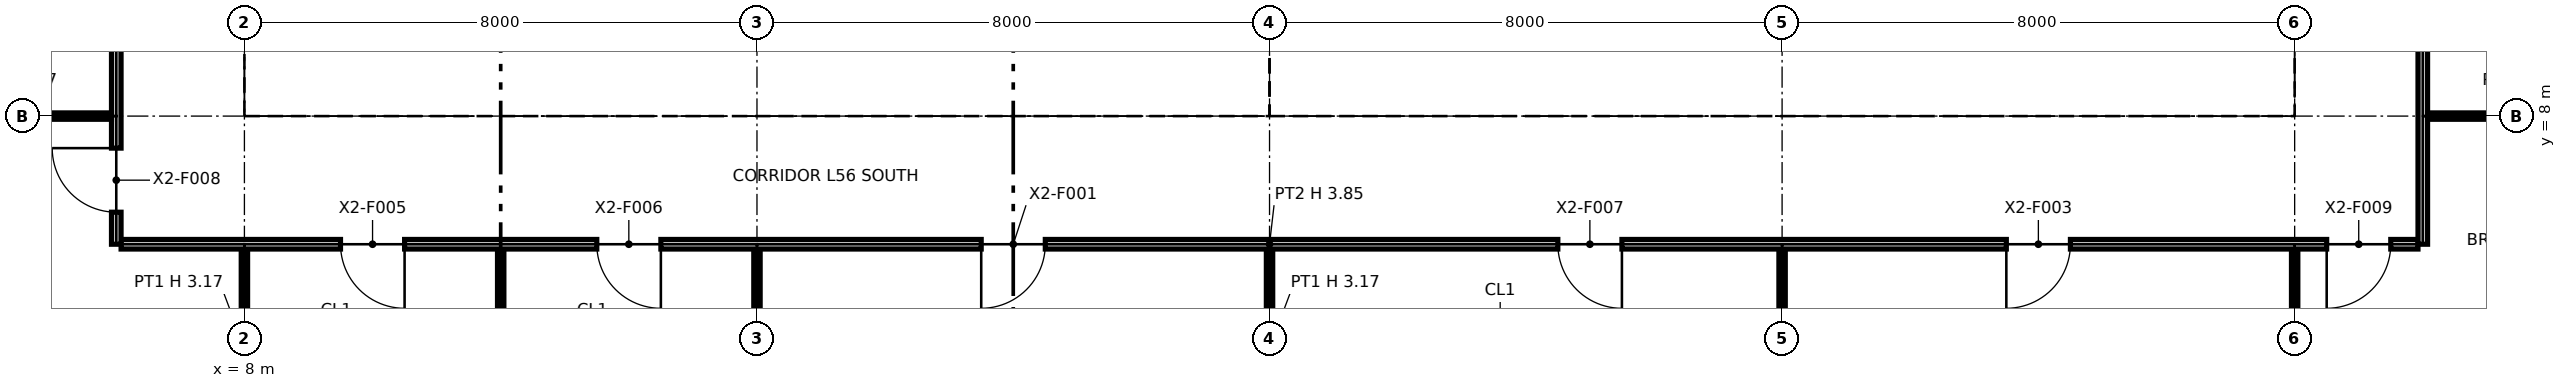
"""IFC4 building model, lengths in metres.
Left out: names, types, materials, properties, quantities, classifications, styles, units other than length and angle.
Written with IfcOpenShell. Run it as: python <this file> out.ifc"""

import sys

from ifc_helpers import new_model, si_unit, direction, frame, frame_2d, origin, origin_2d, place, context, subcontext, project, spatial, polyline, rectangle, i_section, outline, extrude, element, fill, save


model = new_model("IFC4")
c1 = context("Model", 3, precision=1e-05, world=origin(), true_north=direction((0.0, 1.0)))
c2 = subcontext(c1, "Body", "Model", "MODEL_VIEW")
j1 = project(units=[si_unit("LENGTHUNIT", "METRE"), si_unit("PLANEANGLEUNIT", "RADIAN")], contexts=[c1])
p1 = place(None, origin())
s1 = spatial("IfcSite", under=j1, at=p1, CompositionType="ELEMENT")
p2 = place(p1, origin())
s2 = spatial("IfcBuilding", under=s1, at=p2, CompositionType="ELEMENT")
p3 = place(p2, frame((0.0, 0.0, 259.0)))
s3 = spatial("IfcBuildingStorey", under=s2, at=p3, CompositionType="ELEMENT", Elevation=259.0)
for number, where, z_axis, x_axis in (
    (1, (8.0, 8.0, 0.0), (0.0, 0.0, 1.0), (1.0, 0.0, 0.0)),
    (2, (16.0, 8.0, 0.0), (0.0, 0.0, 1.0), (1.0, 0.0, 0.0)),
):
    element("IfcColumn", number, at=place(p3, frame(where, z_axis=z_axis, x_axis=x_axis)), inside=s3, PredefinedType="COLUMN", context=c2, shape_type="SweptSolid", body=[
        extrude(i_section(OverallWidth=0.371, OverallDepth=0.361, WebThickness=0.012, FlangeThickness=0.02, at=origin_2d()), origin(), (0.0, 0.0, 1.0), 3.85),
    ])
p4 = place(p3, frame((24.0, 8.0, 0.0), z_axis=(0.0, 0.0, 1.0), x_axis=(1.0, 0.0, 0.0)))
e3 = element("IfcColumn", 3, at=p4, inside=s3, PredefinedType="COLUMN", context=c2, shape_type="SweptSolid", body=[
    extrude(i_section(OverallWidth=0.373, OverallDepth=0.368, WebThickness=0.015, FlangeThickness=0.024, at=origin_2d()), origin(), (0.0, 0.0, 1.0), 3.85),
])
for number, where, z_axis, x_axis in (
    (4, (32.0, 8.0, 0.0), (0.0, 0.0, 1.0), (1.0, 0.0, 0.0)),
    (5, (40.0, 8.0, 0.0), (0.0, 0.0, 1.0), (1.0, 0.0, 0.0)),
):
    element("IfcColumn", number, at=place(p3, frame(where, z_axis=z_axis, x_axis=x_axis)), inside=s3, PredefinedType="COLUMN", context=c2, shape_type="SweptSolid", body=[
        extrude(i_section(OverallWidth=0.371, OverallDepth=0.361, WebThickness=0.012, FlangeThickness=0.02, at=origin_2d()), origin(), (0.0, 0.0, 1.0), 3.85),
    ])
p5 = place(p3, frame((8.65, 8.75, 0.0), z_axis=(0.0, 0.0, 1.0), x_axis=(1.0, 0.0, 0.0)))
e6 = element("IfcWall", 6, at=p5, inside=s3, PredefinedType="PARTITIONING", context=c2, shape_type="SweptSolid", body=[
    extrude(outline(polyline([(0.0, 0.0), (14.7, 0.0), (14.7, 3.85), (7.438, 3.85), (7.438, 3.308), (7.262, 3.308), (7.261, 3.85), (0.0, 3.85), (0.0, 0.0)])), frame((0.0, 0.1, 0.0), z_axis=(0.0, -1.0, 0.0), x_axis=(1.0, 0.0, 0.0)), (0.0, 0.0, 1.0), 0.2),
])
p6 = place(p5, frame((1.3, 0.0, 0.0)))
e7 = element("IfcOpeningElement", 7, at=p6, cuts=e6, PredefinedType="OPENING", context=c2, shape_type="SweptSolid", body=[
    extrude(rectangle(XDim=1.4, YDim=2.1, at=frame_2d((0.7, 1.05))), frame((0.0, 0.11, 0.0), z_axis=(0.0, -1.0, 0.0), x_axis=(1.0, 0.0, 0.0)), (0.0, 0.0, 1.0), 0.22),
])
p7 = place(p5, frame((4.6, 0.0, 0.0)))
e8 = element("IfcOpeningElement", 8, at=p7, cuts=e6, PredefinedType="OPENING", context=c2, shape_type="SweptSolid", body=[
    extrude(rectangle(XDim=1.4, YDim=2.1, at=frame_2d((0.7, 1.05))), frame((0.0, 0.11, 0.0), z_axis=(0.0, -1.0, 0.0), x_axis=(1.0, 0.0, 0.0)), (0.0, 0.0, 1.0), 0.22),
])
p8 = place(p5, frame((10.4, 0.0, 0.0)))
e9 = element("IfcOpeningElement", 9, at=p8, cuts=e6, PredefinedType="OPENING", context=c2, shape_type="SweptSolid", body=[
    extrude(rectangle(XDim=1.2, YDim=2.1, at=frame_2d((0.6, 1.05))), frame((0.0, 0.11, 0.0), z_axis=(0.0, -1.0, 0.0), x_axis=(1.0, 0.0, 0.0)), (0.0, 0.0, 1.0), 0.22),
])
p9 = place(p3, frame((8.75, 8.85, 0.0), z_axis=(0.0, 0.0, 1.0), x_axis=(0.0, 1.0, 0.0)))
e10 = element("IfcWall", 10, at=p9, inside=s3, PredefinedType="PARTITIONING", context=c2, shape_type="SweptSolid", body=[
    extrude(outline(polyline([(0.0, 0.0), (14.3, 0.0), (14.3, 3.85), (10.225, 3.85), (10.224, 3.44), (10.076, 3.44), (10.075, 3.85), (7.239, 3.85), (7.238, 3.308), (7.062, 3.308), (7.062, 3.85), (0.0, 3.85), (0.0, 0.0)])), frame((0.0, 0.1, 0.0), z_axis=(0.0, -1.0, 0.0), x_axis=(1.0, 0.0, 0.0)), (0.0, 0.0, 1.0), 0.2),
])
p10 = place(p9, frame((8.3, 0.0, 0.0)))
e11 = element("IfcOpeningElement", 11, at=p10, cuts=e10, PredefinedType="OPENING", context=c2, shape_type="SweptSolid", body=[
    extrude(rectangle(XDim=1.8, YDim=2.1, at=frame_2d((0.9, 1.05))), frame((0.0, 0.11, 0.0), z_axis=(0.0, -1.0, 0.0), x_axis=(1.0, 0.0, 0.0)), (0.0, 0.0, 1.0), 0.22),
])
p11 = place(p3, frame((12.4, 8.85, 0.0), z_axis=(0.0, 0.0, 1.0), x_axis=(0.0, 1.0, 0.0)))
e12 = element("IfcWall", 12, at=p11, inside=s3, PredefinedType="PARTITIONING", context=c2, shape_type="SweptSolid", body=[
    extrude(rectangle(XDim=6.85, YDim=0.2, at=frame_2d((3.425, 0.0))), origin(), (0.0, 0.0, 1.0), 3.85),
])
p12 = place(p3, frame((15.85, 8.85, 0.0), z_axis=(0.0, 0.0, 1.0), x_axis=(0.0, 1.0, 0.0)))
e13 = element("IfcWall", 13, at=p12, inside=s3, PredefinedType="PARTITIONING", context=c2, shape_type="SweptSolid", body=[
    extrude(rectangle(XDim=1.55, YDim=0.9, at=frame_2d((0.775, 0.0))), origin(), (0.0, 0.0, 1.0), 3.308),
])
p13 = place(p12, frame((0.3, 0.0, 0.0)))
e14 = element("IfcOpeningElement", 14, at=p13, cuts=e13, PredefinedType="OPENING", context=c2, shape_type="SweptSolid", body=[
    extrude(rectangle(XDim=1.1, YDim=2.1, at=frame_2d((0.55, 1.05))), frame((0.0, 0.46, 0.0), z_axis=(0.0, -1.0, 0.0), x_axis=(1.0, 0.0, 0.0)), (0.0, 0.0, 1.0), 0.92),
])
p14 = place(p3, frame((23.25, 8.85, 0.0), z_axis=(0.0, 0.0, 1.0), x_axis=(0.0, 1.0, 0.0)))
e15 = element("IfcWall", 15, at=p14, inside=s3, PredefinedType="PARTITIONING", context=c2, shape_type="SweptSolid", body=[
    extrude(outline(polyline([(0.0, 0.0), (14.3, 0.0), (14.3, 3.85), (10.225, 3.85), (10.224, 3.44), (10.076, 3.44), (10.075, 3.85), (7.239, 3.85), (7.238, 3.308), (7.062, 3.308), (7.062, 3.85), (5.225, 3.85), (5.224, 3.44), (5.076, 3.44), (5.075, 3.85), (0.0, 3.85), (0.0, 0.0)])), frame((0.0, 0.1, 0.0), z_axis=(0.0, -1.0, 0.0), x_axis=(1.0, 0.0, 0.0)), (0.0, 0.0, 1.0), 0.2),
])
p15 = place(p14, frame((8.3, 0.0, 0.0)))
e16 = element("IfcOpeningElement", 16, at=p15, cuts=e15, PredefinedType="OPENING", context=c2, shape_type="SweptSolid", body=[
    extrude(rectangle(XDim=1.8, YDim=2.1, at=frame_2d((0.9, 1.05))), frame((0.0, 0.11, 0.0), z_axis=(0.0, -1.0, 0.0), x_axis=(1.0, 0.0, 0.0)), (0.0, 0.0, 1.0), 0.22),
])
p16 = place(p3, frame((24.65, 8.75, 0.0), z_axis=(0.0, 0.0, 1.0), x_axis=(1.0, 0.0, 0.0)))
e17 = element("IfcWall", 17, at=p16, inside=s3, PredefinedType="PARTITIONING", context=c2, shape_type="SweptSolid", body=[
    extrude(outline(polyline([(0.0, 0.0), (14.7, 0.0), (14.7, 3.85), (7.438, 3.85), (7.438, 3.308), (7.262, 3.308), (7.261, 3.85), (0.0, 3.85), (0.0, 0.0)])), frame((0.0, 0.1, 0.0), z_axis=(0.0, -1.0, 0.0), x_axis=(1.0, 0.0, 0.0)), (0.0, 0.0, 1.0), 0.2),
])
p17 = place(p3, frame((24.75, 8.85, 0.0), z_axis=(0.0, 0.0, 1.0), x_axis=(0.0, 1.0, 0.0)))
e18 = element("IfcWall", 18, at=p17, inside=s3, PredefinedType="PARTITIONING", context=c2, shape_type="SweptSolid", body=[
    extrude(outline(polyline([(0.0, 0.0), (6.3, 0.0), (6.3, 3.85), (3.225, 3.85), (3.224, 3.44), (3.076, 3.44), (3.075, 3.85), (0.0, 3.85), (0.0, 0.0)])), frame((0.0, 0.1, 0.0), z_axis=(0.0, -1.0, 0.0), x_axis=(1.0, 0.0, 0.0)), (0.0, 0.0, 1.0), 0.2),
])
for number, where, z_axis, x_axis in (
    (19, (27.2, 8.85, 0.0), (0.0, 0.0, 1.0), (0.0, 1.0, 0.0)),
    (20, (29.5, 8.85, 0.0), (0.0, 0.0, 1.0), (0.0, 1.0, 0.0)),
):
    element("IfcWall", number, at=place(p3, frame(where, z_axis=z_axis, x_axis=x_axis)), inside=s3, PredefinedType="PARTITIONING", context=c2, shape_type="SweptSolid", body=[
        extrude(rectangle(XDim=2.55, YDim=0.2, at=frame_2d((1.275, 0.0))), origin(), (0.0, 0.0, 1.0), 3.85),
    ])
p18 = place(p3, frame((32.0, 8.85, 0.0), z_axis=(0.0, 0.0, 1.0), x_axis=(0.0, 1.0, 0.0)))
e21 = element("IfcWall", 21, at=p18, inside=s3, PredefinedType="PARTITIONING", context=c2, shape_type="SweptSolid", body=[
    extrude(rectangle(XDim=2.55, YDim=0.6, at=frame_2d((1.275, 0.0))), origin(), (0.0, 0.0, 1.0), 3.308),
])
for number, where, z_axis, x_axis in (
    (22, (35.6, 8.85, 0.0), (0.0, 0.0, 1.0), (0.0, 1.0, 0.0)),
    (23, (39.25, 8.85, 0.0), (0.0, 0.0, 1.0), (0.0, 1.0, 0.0)),
):
    element("IfcWall", number, at=place(p3, frame(where, z_axis=z_axis, x_axis=x_axis)), inside=s3, PredefinedType="PARTITIONING", context=c2, shape_type="SweptSolid", body=[
        extrude(rectangle(XDim=6.3, YDim=0.2, at=frame_2d((3.15, 0.0))), origin(), (0.0, 0.0, 1.0), 3.85),
    ])
p19 = place(p3, frame((40.0, 2.0, 0.0), z_axis=(0.0, 0.0, 1.0), x_axis=(0.0, 1.0, 0.0)))
e24 = element("IfcWall", 24, at=p19, inside=s3, PredefinedType="PARTITIONING", context=c2, shape_type="SweptSolid", body=[
    extrude(rectangle(XDim=3.925, YDim=0.1, at=frame_2d((1.962, 0.0))), origin(), (0.0, 0.0, 1.0), 3.172),
])
for number, where, z_axis, x_axis in (
    (25, (8.0, 2.83, 0.0), (0.0, 0.0, 1.0), (0.0, 1.0, 0.0)),
    (26, (12.0, 2.83, 0.0), (0.0, 0.0, 1.0), (0.0, 1.0, 0.0)),
    (27, (16.0, 2.83, 0.0), (0.0, 0.0, 1.0), (0.0, 1.0, 0.0)),
    (28, (24.0, 2.83, 0.0), (0.0, 0.0, 1.0), (0.0, 1.0, 0.0)),
    (29, (32.0, 2.83, 0.0), (0.0, 0.0, 1.0), (0.0, 1.0, 0.0)),
):
    element("IfcWall", number, at=place(p3, frame(where, z_axis=z_axis, x_axis=x_axis)), inside=s3, PredefinedType="PARTITIONING", context=c2, shape_type="SweptSolid", body=[
        extrude(rectangle(XDim=3.095, YDim=0.1, at=frame_2d((1.547, 0.0))), origin(), (0.0, 0.0, 1.0), 3.172),
    ])
p20 = place(p3, frame((6.075, 6.0, 0.0), z_axis=(0.0, 0.0, 1.0), x_axis=(1.0, 0.0, 0.0)))
e30 = element("IfcWall", 30, at=p20, inside=s3, PredefinedType="PARTITIONING", context=c2, shape_type="SweptSolid", body=[
    extrude(rectangle(XDim=35.85, YDim=0.15, at=frame_2d((17.925, 0.0))), origin(), (0.0, 0.0, 1.0), 3.85),
])
p21 = place(p20, frame((14.425, 0.0, 0.0), z_axis=(0.0, 0.0, 1.0), x_axis=(-1.0, 0.0, 0.0)))
e31 = element("IfcOpeningElement", 31, at=p21, cuts=e30, PredefinedType="OPENING", context=c2, shape_type="SweptSolid", body=[
    extrude(rectangle(XDim=1.0, YDim=2.1, at=frame_2d((0.5, 1.05))), frame((0.0, 0.085, 0.0), z_axis=(0.0, -1.0, 0.0), x_axis=(1.0, 0.0, 0.0)), (0.0, 0.0, 1.0), 0.17),
])
p22 = place(p20, frame((30.425, 0.0, 0.0), z_axis=(0.0, 0.0, 1.0), x_axis=(-1.0, 0.0, 0.0)))
e32 = element("IfcOpeningElement", 32, at=p22, cuts=e30, PredefinedType="OPENING", context=c2, shape_type="SweptSolid", body=[
    extrude(rectangle(XDim=1.0, YDim=2.1, at=frame_2d((0.5, 1.05))), frame((0.0, 0.085, 0.0), z_axis=(0.0, -1.0, 0.0), x_axis=(1.0, 0.0, 0.0)), (0.0, 0.0, 1.0), 0.17),
])
p23 = place(p20, frame((4.425, 0.0, 0.0), z_axis=(0.0, 0.0, 1.0), x_axis=(-1.0, 0.0, 0.0)))
e33 = element("IfcOpeningElement", 33, at=p23, cuts=e30, PredefinedType="OPENING", context=c2, shape_type="SweptSolid", body=[
    extrude(rectangle(XDim=1.0, YDim=2.1, at=frame_2d((0.5, 1.05))), frame((0.0, 0.085, 0.0), z_axis=(0.0, -1.0, 0.0), x_axis=(1.0, 0.0, 0.0)), (0.0, 0.0, 1.0), 0.17),
])
p24 = place(p20, frame((8.425, 0.0, 0.0), z_axis=(0.0, 0.0, 1.0), x_axis=(-1.0, 0.0, 0.0)))
e34 = element("IfcOpeningElement", 34, at=p24, cuts=e30, PredefinedType="OPENING", context=c2, shape_type="SweptSolid", body=[
    extrude(rectangle(XDim=1.0, YDim=2.1, at=frame_2d((0.5, 1.05))), frame((0.0, 0.085, 0.0), z_axis=(0.0, -1.0, 0.0), x_axis=(1.0, 0.0, 0.0)), (0.0, 0.0, 1.0), 0.17),
])
p25 = place(p20, frame((23.425, 0.0, 0.0), z_axis=(0.0, 0.0, 1.0), x_axis=(-1.0, 0.0, 0.0)))
e35 = element("IfcOpeningElement", 35, at=p25, cuts=e30, PredefinedType="OPENING", context=c2, shape_type="SweptSolid", body=[
    extrude(rectangle(XDim=1.0, YDim=2.1, at=frame_2d((0.5, 1.05))), frame((0.0, 0.085, 0.0), z_axis=(0.0, -1.0, 0.0), x_axis=(1.0, 0.0, 0.0)), (0.0, 0.0, 1.0), 0.17),
])
p26 = place(p20, frame((35.425, 0.0, 0.0), z_axis=(0.0, 0.0, 1.0), x_axis=(-1.0, 0.0, 0.0)))
e36 = element("IfcOpeningElement", 36, at=p26, cuts=e30, PredefinedType="OPENING", context=c2, shape_type="SweptSolid", body=[
    extrude(rectangle(XDim=1.0, YDim=2.1, at=frame_2d((0.5, 1.05))), frame((0.0, 0.085, 0.0), z_axis=(0.0, -1.0, 0.0), x_axis=(1.0, 0.0, 0.0)), (0.0, 0.0, 1.0), 0.17),
])
p27 = place(p3, frame((6.0, 6.0, 0.0), z_axis=(0.0, 0.0, 1.0), x_axis=(0.0, 1.0, 0.0)))
e37 = element("IfcWall", 37, at=p27, inside=s3, PredefinedType="PARTITIONING", context=c2, shape_type="SweptSolid", body=[
    extrude(outline(polyline([(0.0, 0.0), (13.375, 0.0), (13.375, 3.85), (10.3, 3.85), (10.298, 3.172), (9.702, 3.172), (9.7, 3.85), (6.3, 3.85), (6.298, 3.172), (5.702, 3.172), (5.7, 3.85), (2.3, 3.85), (2.298, 3.172), (1.702, 3.172), (1.7, 3.85), (0.0, 3.85), (0.0, 0.0)])), frame((0.0, 0.075, 0.0), z_axis=(0.0, -1.0, 0.0), x_axis=(1.0, 0.0, 0.0)), (0.0, 0.0, 1.0), 0.15),
])
p28 = place(p27, frame((0.5, 0.0, 0.0)))
e38 = element("IfcOpeningElement", 38, at=p28, cuts=e37, PredefinedType="OPENING", context=c2, shape_type="SweptSolid", body=[
    extrude(rectangle(XDim=1.0, YDim=2.1, at=frame_2d((0.5, 1.05))), frame((0.0, 0.085, 0.0), z_axis=(0.0, -1.0, 0.0), x_axis=(1.0, 0.0, 0.0)), (0.0, 0.0, 1.0), 0.17),
])
p29 = place(p27, frame((5.5, 0.0, 0.0)))
e39 = element("IfcOpeningElement", 39, at=p29, cuts=e37, PredefinedType="OPENING", context=c2, shape_type="SweptSolid", body=[
    extrude(rectangle(XDim=1.0, YDim=2.1, at=frame_2d((0.5, 1.05))), frame((0.0, 0.085, 0.0), z_axis=(0.0, -1.0, 0.0), x_axis=(1.0, 0.0, 0.0)), (0.0, 0.0, 1.0), 0.17),
])
p30 = place(p27, frame((11.225, 0.0, 0.0)))
e40 = element("IfcOpeningElement", 40, at=p30, cuts=e37, PredefinedType="OPENING", context=c2, shape_type="SweptSolid", body=[
    extrude(rectangle(XDim=1.0, YDim=2.1, at=frame_2d((0.5, 1.05))), frame((0.0, 0.085, 0.0), z_axis=(0.0, -1.0, 0.0), x_axis=(1.0, 0.0, 0.0)), (0.0, 0.0, 1.0), 0.17),
])
p31 = place(p3, frame((42.0, 6.0, 0.0), z_axis=(0.0, 0.0, 1.0), x_axis=(0.0, 1.0, 0.0)))
e41 = element("IfcWall", 41, at=p31, inside=s3, PredefinedType="PARTITIONING", context=c2, shape_type="SweptSolid", body=[
    extrude(outline(polyline([(0.0, 0.0), (11.925, 0.0), (11.925, 3.85), (10.3, 3.85), (10.298, 3.172), (9.702, 3.172), (9.7, 3.85), (6.3, 3.85), (6.298, 3.172), (5.702, 3.172), (5.7, 3.85), (2.3, 3.85), (2.298, 3.172), (1.702, 3.172), (1.7, 3.85), (0.0, 3.85), (0.0, 0.0)])), frame((0.0, 0.075, 0.0), z_axis=(0.0, -1.0, 0.0), x_axis=(1.0, 0.0, 0.0)), (0.0, 0.0, 1.0), 0.15),
])
p32 = place(p31, frame((6.5, 0.0, 0.0), z_axis=(0.0, 0.0, 1.0), x_axis=(-1.0, 0.0, 0.0)))
e42 = element("IfcOpeningElement", 42, at=p32, cuts=e41, PredefinedType="OPENING", context=c2, shape_type="SweptSolid", body=[
    extrude(rectangle(XDim=1.0, YDim=2.1, at=frame_2d((0.5, 1.05))), frame((0.0, 0.085, 0.0), z_axis=(0.0, -1.0, 0.0), x_axis=(1.0, 0.0, 0.0)), (0.0, 0.0, 1.0), 0.17),
])
p33 = place(p31, frame((11.5, 0.0, 0.0), z_axis=(0.0, 0.0, 1.0), x_axis=(-1.0, 0.0, 0.0)))
e43 = element("IfcOpeningElement", 43, at=p33, cuts=e41, PredefinedType="OPENING", context=c2, shape_type="SweptSolid", body=[
    extrude(rectangle(XDim=1.0, YDim=2.1, at=frame_2d((0.5, 1.05))), frame((0.0, 0.085, 0.0), z_axis=(0.0, -1.0, 0.0), x_axis=(1.0, 0.0, 0.0)), (0.0, 0.0, 1.0), 0.17),
])
for number, where, z_axis, x_axis in (
    (44, (2.83, 8.0, 0.0), (0.0, 0.0, 1.0), (1.0, 0.0, 0.0)),
    (45, (42.075, 8.0, 0.0), (0.0, 0.0, 1.0), (1.0, 0.0, 0.0)),
):
    element("IfcWall", number, at=place(p3, frame(where, z_axis=z_axis, x_axis=x_axis)), inside=s3, PredefinedType="PARTITIONING", context=c2, shape_type="SweptSolid", body=[
        extrude(rectangle(XDim=3.095, YDim=0.1, at=frame_2d((1.547, 0.0))), origin(), (0.0, 0.0, 1.0), 3.172),
    ])
p34 = place(p6, origin())
e46 = element("IfcDoor", 46, at=p34, inside=s3, OperationType="DOUBLE_DOOR_SINGLE_SWING", PredefinedType="NOTDEFINED", context=c2, shape_type="SweptSolid", body=[
    extrude(rectangle(XDim=1.4, YDim=2.1, at=frame_2d((0.7, 1.05))), frame((0.0, 0.025, 0.0), z_axis=(0.0, -1.0, 0.0), x_axis=(1.0, 0.0, 0.0)), (0.0, 0.0, 1.0), 0.05),
])
fill(e7, e46)
p35 = place(p7, origin())
e47 = element("IfcDoor", 47, at=p35, inside=s3, OperationType="DOUBLE_DOOR_SINGLE_SWING", PredefinedType="NOTDEFINED", context=c2, shape_type="SweptSolid", body=[
    extrude(rectangle(XDim=1.4, YDim=2.1, at=frame_2d((0.7, 1.05))), frame((0.0, 0.025, 0.0), z_axis=(0.0, -1.0, 0.0), x_axis=(1.0, 0.0, 0.0)), (0.0, 0.0, 1.0), 0.05),
])
fill(e8, e47)
p36 = place(p8, origin())
e48 = element("IfcDoor", 48, at=p36, inside=s3, OperationType="SINGLE_SWING_LEFT", PredefinedType="NOTDEFINED", context=c2, shape_type="SweptSolid", body=[
    extrude(rectangle(XDim=1.2, YDim=2.1, at=frame_2d((0.6, 1.05))), frame((0.0, 0.025, 0.0), z_axis=(0.0, -1.0, 0.0), x_axis=(1.0, 0.0, 0.0)), (0.0, 0.0, 1.0), 0.05),
])
fill(e9, e48)
p37 = place(p21, origin())
e49 = element("IfcDoor", 49, at=p37, inside=s3, OperationType="SINGLE_SWING_RIGHT", PredefinedType="DOOR", context=c2, shape_type="SweptSolid", body=[
    extrude(rectangle(XDim=1.0, YDim=2.1, at=frame_2d((0.5, 1.05))), frame((0.0, 0.025, 0.0), z_axis=(0.0, -1.0, 0.0), x_axis=(1.0, 0.0, 0.0)), (0.0, 0.0, 1.0), 0.05),
])
fill(e31, e49)
p38 = place(p22, origin())
e50 = element("IfcDoor", 50, at=p38, inside=s3, OperationType="SINGLE_SWING_RIGHT", PredefinedType="DOOR", context=c2, shape_type="SweptSolid", body=[
    extrude(rectangle(XDim=1.0, YDim=2.1, at=frame_2d((0.5, 1.05))), frame((0.0, 0.025, 0.0), z_axis=(0.0, -1.0, 0.0), x_axis=(1.0, 0.0, 0.0)), (0.0, 0.0, 1.0), 0.05),
])
fill(e32, e50)
p39 = place(p23, origin())
e51 = element("IfcDoor", 51, at=p39, inside=s3, OperationType="SINGLE_SWING_LEFT", PredefinedType="DOOR", context=c2, shape_type="SweptSolid", body=[
    extrude(rectangle(XDim=1.0, YDim=2.1, at=frame_2d((0.5, 1.05))), frame((0.0, 0.025, 0.0), z_axis=(0.0, -1.0, 0.0), x_axis=(1.0, 0.0, 0.0)), (0.0, 0.0, 1.0), 0.05),
])
fill(e33, e51)
p40 = place(p24, origin())
e52 = element("IfcDoor", 52, at=p40, inside=s3, OperationType="SINGLE_SWING_LEFT", PredefinedType="DOOR", context=c2, shape_type="SweptSolid", body=[
    extrude(rectangle(XDim=1.0, YDim=2.1, at=frame_2d((0.5, 1.05))), frame((0.0, 0.025, 0.0), z_axis=(0.0, -1.0, 0.0), x_axis=(1.0, 0.0, 0.0)), (0.0, 0.0, 1.0), 0.05),
])
fill(e34, e52)
p41 = place(p25, origin())
e53 = element("IfcDoor", 53, at=p41, inside=s3, OperationType="SINGLE_SWING_LEFT", PredefinedType="DOOR", context=c2, shape_type="SweptSolid", body=[
    extrude(rectangle(XDim=1.0, YDim=2.1, at=frame_2d((0.5, 1.05))), frame((0.0, 0.025, 0.0), z_axis=(0.0, -1.0, 0.0), x_axis=(1.0, 0.0, 0.0)), (0.0, 0.0, 1.0), 0.05),
])
fill(e35, e53)
p42 = place(p28, origin())
e54 = element("IfcDoor", 54, at=p42, inside=s3, OperationType="SINGLE_SWING_RIGHT", PredefinedType="DOOR", context=c2, shape_type="SweptSolid", body=[
    extrude(rectangle(XDim=1.0, YDim=2.1, at=frame_2d((0.5, 1.05))), frame((0.0, 0.025, 0.0), z_axis=(0.0, -1.0, 0.0), x_axis=(1.0, 0.0, 0.0)), (0.0, 0.0, 1.0), 0.05),
])
fill(e38, e54)
p43 = place(p26, origin())
e55 = element("IfcDoor", 55, at=p43, inside=s3, OperationType="SINGLE_SWING_RIGHT", PredefinedType="DOOR", context=c2, shape_type="SweptSolid", body=[
    extrude(rectangle(XDim=1.0, YDim=2.1, at=frame_2d((0.5, 1.05))), frame((0.0, 0.025, 0.0), z_axis=(0.0, -1.0, 0.0), x_axis=(1.0, 0.0, 0.0)), (0.0, 0.0, 1.0), 0.05),
])
fill(e36, e55)
save(model, sys.argv[1])
